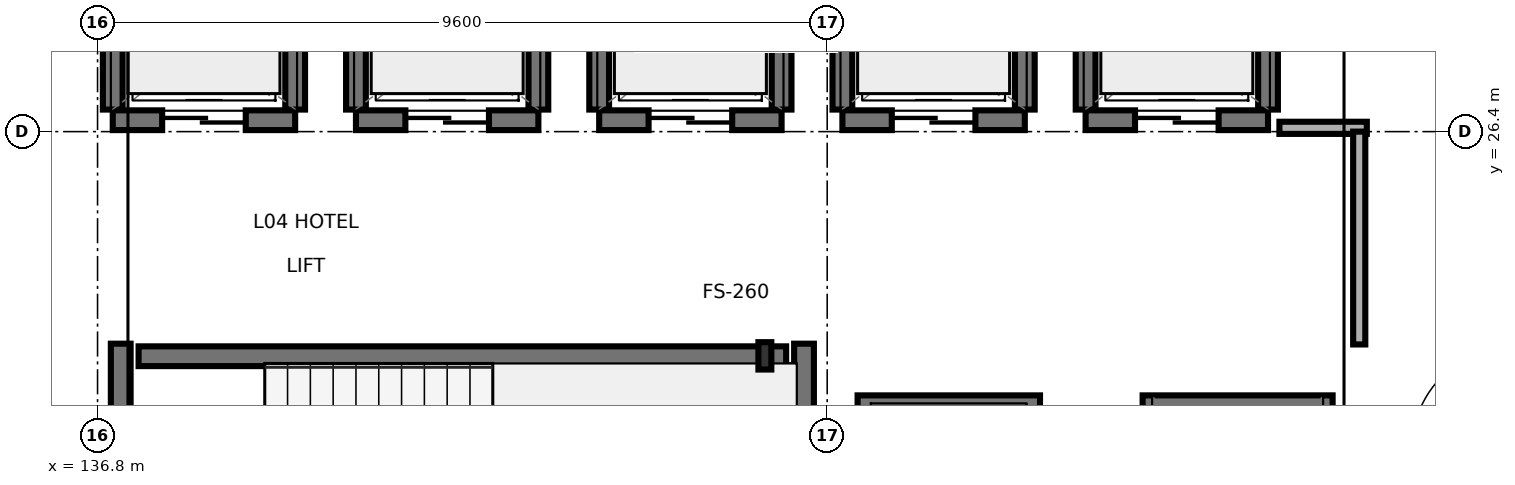
"""IFC4 building model, lengths in metres.
Left out: names, types, materials, properties, quantities, classifications, styles, units other than length and angle.
Written with IfcOpenShell. Run it as: python <this file> out.ifc"""

import sys

from ifc_helpers import new_model, si_unit, direction, frame, frame_2d, origin, origin_2d, place, context, subcontext, project, spatial, rectangle, i_section, extrude, element, fill, save


model = new_model("IFC4")
c1 = context("Model", 3, precision=1e-05, world=origin(), true_north=direction((0.0, 1.0)))
c2 = subcontext(c1, "Body", "Model", "MODEL_VIEW")
j1 = project(units=[si_unit("LENGTHUNIT", "METRE"), si_unit("PLANEANGLEUNIT", "RADIAN")], contexts=[c1])
p1 = place(None, origin())
s1 = spatial("IfcSite", under=j1, at=p1, CompositionType="ELEMENT")
p2 = place(p1, origin())
s2 = spatial("IfcBuilding", under=s1, at=p2, CompositionType="ELEMENT")
p3 = place(p2, frame((0.0, 0.0, 14.7)))
s3 = spatial("IfcBuildingStorey", under=s2, at=p3, CompositionType="ELEMENT", Elevation=14.7)
p4 = place(p3, frame((145.58, 23.45, 0.0), z_axis=(0.0, 0.0, 1.0), x_axis=(1.0, 0.0, 0.0)))
e1 = element("IfcColumn", 1, at=p4, inside=s3, PredefinedType="PILASTER", context=c2, shape_type="SweptSolid", body=[
    extrude(i_section(OverallWidth=0.17, OverallDepth=0.36, WebThickness=0.008, FlangeThickness=0.013, FilletRadius=0.018, at=origin_2d()), origin(), (0.0, 0.0, 1.0), 3.4),
])
p5 = place(p3, frame((137.105, 19.34, 0.0), z_axis=(0.0, 0.0, 1.0), x_axis=(0.0, 1.0, 0.0)))
e2 = element("IfcWall", 2, at=p5, inside=s3, PredefinedType="SHEAR", context=c2, shape_type="SweptSolid", body=[
    extrude(rectangle(XDim=4.27, YDim=0.26, at=frame_2d((2.135, 0.0))), origin(), (0.0, 0.0, 1.0), 3.215),
])
p6 = place(p5, frame((0.61, 0.0, 0.0)))
e3 = element("IfcOpeningElement", 3, at=p6, cuts=e2, PredefinedType="OPENING", context=c2, shape_type="SweptSolid", body=[
    extrude(rectangle(XDim=1.1, YDim=2.2, at=frame_2d((0.55, 1.1))), frame((0.0, 0.14, 0.0), z_axis=(0.0, -1.0, 0.0), x_axis=(1.0, 0.0, 0.0)), (0.0, 0.0, 1.0), 0.28),
])
p7 = place(p3, frame((146.095, 19.34, 0.0), z_axis=(0.0, 0.0, 1.0), x_axis=(0.0, 1.0, 0.0)))
e4 = element("IfcWall", 4, at=p7, inside=s3, PredefinedType="SHEAR", context=c2, shape_type="SweptSolid", body=[
    extrude(rectangle(XDim=4.27, YDim=0.26, at=frame_2d((2.135, 0.0))), origin(), (0.0, 0.0, 1.0), 3.215),
])
p8 = place(p3, frame((137.34, 23.445, 0.0), z_axis=(0.0, 0.0, 1.0), x_axis=(1.0, 0.0, 0.0)))
e5 = element("IfcWall", 5, at=p8, inside=s3, PredefinedType="SHEAR", context=c2, shape_type="SweptSolid", body=[
    extrude(rectangle(XDim=8.52, YDim=0.26, at=frame_2d((4.26, 0.0))), origin(), (0.0, 0.0, 1.0), 3.215),
])
p9 = place(p3, frame((137.0, 26.55, 0.0), z_axis=(0.0, 0.0, 1.0), x_axis=(1.0, 0.0, 0.0)))
e6 = element("IfcWall", 6, at=p9, inside=s3, PredefinedType="SHEAR", context=c2, shape_type="SweptSolid", body=[
    extrude(rectangle(XDim=2.4, YDim=0.26, at=frame_2d((1.2, 0.0))), origin(), (0.0, 0.0, 1.0), 2.75),
])
p10 = place(p9, frame((0.65, 0.0, 0.0)))
e7 = element("IfcOpeningElement", 7, at=p10, cuts=e6, PredefinedType="OPENING", context=c2, shape_type="SweptSolid", body=[
    extrude(rectangle(XDim=1.1, YDim=2.2, at=frame_2d((0.55, 1.1))), frame((0.0, 0.14, 0.0), z_axis=(0.0, -1.0, 0.0), x_axis=(1.0, 0.0, 0.0)), (0.0, 0.0, 1.0), 0.28),
])
for number, where, z_axis, x_axis in (
    (8, (137.0, 26.69, 0.0), (0.0, 0.0, 1.0), (0.0, 1.0, 0.0)),
    (9, (139.4, 26.69, 0.0), (0.0, 0.0, 1.0), (0.0, 1.0, 0.0)),
):
    element("IfcWall", number, at=place(p3, frame(where, z_axis=z_axis, x_axis=x_axis)), inside=s3, PredefinedType="SHEAR", context=c2, shape_type="SweptSolid", body=[
        extrude(rectangle(XDim=1.82, YDim=0.26, at=frame_2d((0.91, 0.0))), origin(), (0.0, 0.0, 1.0), 2.75),
    ])
p11 = place(p3, frame((140.2, 26.55, 0.0), z_axis=(0.0, 0.0, 1.0), x_axis=(1.0, 0.0, 0.0)))
e10 = element("IfcWall", 10, at=p11, inside=s3, PredefinedType="SHEAR", context=c2, shape_type="SweptSolid", body=[
    extrude(rectangle(XDim=2.4, YDim=0.26, at=frame_2d((1.2, 0.0))), origin(), (0.0, 0.0, 1.0), 3.215),
])
p12 = place(p11, frame((0.65, 0.0, 0.0)))
e11 = element("IfcOpeningElement", 11, at=p12, cuts=e10, PredefinedType="OPENING", context=c2, shape_type="SweptSolid", body=[
    extrude(rectangle(XDim=1.1, YDim=2.2, at=frame_2d((0.55, 1.1))), frame((0.0, 0.14, 0.0), z_axis=(0.0, -1.0, 0.0), x_axis=(1.0, 0.0, 0.0)), (0.0, 0.0, 1.0), 0.28),
])
for number, where, z_axis, x_axis in (
    (12, (140.2, 26.69, 0.0), (0.0, 0.0, 1.0), (0.0, 1.0, 0.0)),
    (13, (142.6, 26.69, 0.0), (0.0, 0.0, 1.0), (0.0, 1.0, 0.0)),
):
    element("IfcWall", number, at=place(p3, frame(where, z_axis=z_axis, x_axis=x_axis)), inside=s3, PredefinedType="SHEAR", context=c2, shape_type="SweptSolid", body=[
        extrude(rectangle(XDim=1.82, YDim=0.26, at=frame_2d((0.91, 0.0))), origin(), (0.0, 0.0, 1.0), 3.215),
    ])
p13 = place(p3, frame((143.4, 26.55, 0.0), z_axis=(0.0, 0.0, 1.0), x_axis=(1.0, 0.0, 0.0)))
e14 = element("IfcWall", 14, at=p13, inside=s3, PredefinedType="SHEAR", context=c2, shape_type="SweptSolid", body=[
    extrude(rectangle(XDim=2.4, YDim=0.26, at=frame_2d((1.2, 0.0))), origin(), (0.0, 0.0, 1.0), 3.215),
])
p14 = place(p13, frame((0.65, 0.0, 0.0)))
e15 = element("IfcOpeningElement", 15, at=p14, cuts=e14, PredefinedType="OPENING", context=c2, shape_type="SweptSolid", body=[
    extrude(rectangle(XDim=1.1, YDim=2.2, at=frame_2d((0.55, 1.1))), frame((0.0, 0.14, 0.0), z_axis=(0.0, -1.0, 0.0), x_axis=(1.0, 0.0, 0.0)), (0.0, 0.0, 1.0), 0.28),
])
for number, where, z_axis, x_axis in (
    (16, (143.4, 26.69, 0.0), (0.0, 0.0, 1.0), (0.0, 1.0, 0.0)),
    (17, (145.8, 26.69, 0.0), (0.0, 0.0, 1.0), (0.0, 1.0, 0.0)),
):
    element("IfcWall", number, at=place(p3, frame(where, z_axis=z_axis, x_axis=x_axis)), inside=s3, PredefinedType="SHEAR", context=c2, shape_type="SweptSolid", body=[
        extrude(rectangle(XDim=1.82, YDim=0.26, at=frame_2d((0.91, 0.0))), origin(), (0.0, 0.0, 1.0), 3.215),
    ])
p15 = place(p3, frame((146.6, 26.55, 0.0), z_axis=(0.0, 0.0, 1.0), x_axis=(1.0, 0.0, 0.0)))
e18 = element("IfcWall", 18, at=p15, inside=s3, PredefinedType="SHEAR", context=c2, shape_type="SweptSolid", body=[
    extrude(rectangle(XDim=2.4, YDim=0.26, at=frame_2d((1.2, 0.0))), origin(), (0.0, 0.0, 1.0), 3.215),
])
p16 = place(p15, frame((0.65, 0.0, 0.0)))
e19 = element("IfcOpeningElement", 19, at=p16, cuts=e18, PredefinedType="OPENING", context=c2, shape_type="SweptSolid", body=[
    extrude(rectangle(XDim=1.1, YDim=2.2, at=frame_2d((0.55, 1.1))), frame((0.0, 0.14, 0.0), z_axis=(0.0, -1.0, 0.0), x_axis=(1.0, 0.0, 0.0)), (0.0, 0.0, 1.0), 0.28),
])
for number, where, z_axis, x_axis in (
    (20, (146.6, 26.69, 0.0), (0.0, 0.0, 1.0), (0.0, 1.0, 0.0)),
    (21, (149.0, 26.69, 0.0), (0.0, 0.0, 1.0), (0.0, 1.0, 0.0)),
):
    element("IfcWall", number, at=place(p3, frame(where, z_axis=z_axis, x_axis=x_axis)), inside=s3, PredefinedType="SHEAR", context=c2, shape_type="SweptSolid", body=[
        extrude(rectangle(XDim=1.82, YDim=0.26, at=frame_2d((0.91, 0.0))), origin(), (0.0, 0.0, 1.0), 3.215),
    ])
p17 = place(p3, frame((149.8, 26.55, 0.0), z_axis=(0.0, 0.0, 1.0), x_axis=(1.0, 0.0, 0.0)))
e22 = element("IfcWall", 22, at=p17, inside=s3, PredefinedType="SHEAR", context=c2, shape_type="SweptSolid", body=[
    extrude(rectangle(XDim=2.4, YDim=0.26, at=frame_2d((1.2, 0.0))), origin(), (0.0, 0.0, 1.0), 3.215),
])
p18 = place(p17, frame((0.65, 0.0, 0.0)))
e23 = element("IfcOpeningElement", 23, at=p18, cuts=e22, PredefinedType="OPENING", context=c2, shape_type="SweptSolid", body=[
    extrude(rectangle(XDim=1.1, YDim=2.2, at=frame_2d((0.55, 1.1))), frame((0.0, 0.14, 0.0), z_axis=(0.0, -1.0, 0.0), x_axis=(1.0, 0.0, 0.0)), (0.0, 0.0, 1.0), 0.28),
])
for number, where, z_axis, x_axis in (
    (24, (149.8, 26.69, 0.0), (0.0, 0.0, 1.0), (0.0, 1.0, 0.0)),
    (25, (152.2, 26.69, 0.0), (0.0, 0.0, 1.0), (0.0, 1.0, 0.0)),
):
    element("IfcWall", number, at=place(p3, frame(where, z_axis=z_axis, x_axis=x_axis)), inside=s3, PredefinedType="SHEAR", context=c2, shape_type="SweptSolid", body=[
        extrude(rectangle(XDim=1.82, YDim=0.26, at=frame_2d((0.91, 0.0))), origin(), (0.0, 0.0, 1.0), 3.215),
    ])
p19 = place(p3, frame((146.8, 22.8, 0.0), z_axis=(0.0, 0.0, 1.0), x_axis=(1.0, 0.0, 0.0)))
e26 = element("IfcWall", 26, at=p19, inside=s3, PredefinedType="SHEAR", context=c2, shape_type="SweptSolid", body=[
    extrude(rectangle(XDim=2.4, YDim=0.26, at=frame_2d((1.2, 0.0))), origin(), (0.0, 0.0, 1.0), 3.215),
])
p20 = place(p3, frame((150.55, 22.8, 0.0), z_axis=(0.0, 0.0, 1.0), x_axis=(1.0, 0.0, 0.0)))
e27 = element("IfcWall", 27, at=p20, inside=s3, PredefinedType="SHEAR", context=c2, shape_type="SweptSolid", body=[
    extrude(rectangle(XDim=2.5, YDim=0.26, at=frame_2d((1.25, 0.0))), origin(), (0.0, 0.0, 1.0), 3.215),
])
p21 = place(p3, frame((152.35, 26.45, 0.0), z_axis=(0.0, 0.0, 1.0), x_axis=(1.0, 0.0, 0.0)))
e28 = element("IfcWall", 28, at=p21, inside=s3, PredefinedType="PARTITIONING", context=c2, shape_type="SweptSolid", body=[
    extrude(rectangle(XDim=1.15, YDim=0.16, at=frame_2d((0.575, 0.0))), origin(), (0.0, 0.0, 1.0), 3.215),
])
p22 = place(p3, frame((153.4, 23.6, 0.0), z_axis=(0.0, 0.0, 1.0), x_axis=(0.0, 1.0, 0.0)))
e29 = element("IfcWall", 29, at=p22, inside=s3, PredefinedType="PARTITIONING", context=c2, shape_type="SweptSolid", body=[
    extrude(rectangle(XDim=2.8, YDim=0.16, at=frame_2d((1.4, 0.0))), origin(), (0.0, 0.0, 1.0), 3.215),
])
p23 = place(p10, origin())
e30 = element("IfcDoor", 30, at=p23, inside=s3, OperationType="SLIDING_TO_LEFT", PredefinedType="DOOR", context=c2, shape_type="SweptSolid", body=[
    extrude(rectangle(XDim=1.1, YDim=2.2, at=frame_2d((0.55, 1.1))), frame((0.0, 0.025, 0.0), z_axis=(0.0, -1.0, 0.0), x_axis=(1.0, 0.0, 0.0)), (0.0, 0.0, 1.0), 0.05),
])
fill(e7, e30)
p24 = place(p12, origin())
e31 = element("IfcDoor", 31, at=p24, inside=s3, OperationType="SLIDING_TO_RIGHT", PredefinedType="DOOR", context=c2, shape_type="SweptSolid", body=[
    extrude(rectangle(XDim=1.1, YDim=2.2, at=frame_2d((0.55, 1.1))), frame((0.0, 0.025, 0.0), z_axis=(0.0, -1.0, 0.0), x_axis=(1.0, 0.0, 0.0)), (0.0, 0.0, 1.0), 0.05),
])
fill(e11, e31)
p25 = place(p14, origin())
e32 = element("IfcDoor", 32, at=p25, inside=s3, OperationType="SLIDING_TO_LEFT", PredefinedType="DOOR", context=c2, shape_type="SweptSolid", body=[
    extrude(rectangle(XDim=1.1, YDim=2.2, at=frame_2d((0.55, 1.1))), frame((0.0, 0.025, 0.0), z_axis=(0.0, -1.0, 0.0), x_axis=(1.0, 0.0, 0.0)), (0.0, 0.0, 1.0), 0.05),
])
fill(e15, e32)
p26 = place(p16, origin())
e33 = element("IfcDoor", 33, at=p26, inside=s3, OperationType="SLIDING_TO_RIGHT", PredefinedType="DOOR", context=c2, shape_type="SweptSolid", body=[
    extrude(rectangle(XDim=1.1, YDim=2.2, at=frame_2d((0.55, 1.1))), frame((0.0, 0.025, 0.0), z_axis=(0.0, -1.0, 0.0), x_axis=(1.0, 0.0, 0.0)), (0.0, 0.0, 1.0), 0.05),
])
fill(e19, e33)
p27 = place(p18, origin())
e34 = element("IfcDoor", 34, at=p27, inside=s3, OperationType="SLIDING_TO_LEFT", PredefinedType="DOOR", context=c2, shape_type="SweptSolid", body=[
    extrude(rectangle(XDim=1.1, YDim=2.2, at=frame_2d((0.55, 1.1))), frame((0.0, 0.025, 0.0), z_axis=(0.0, -1.0, 0.0), x_axis=(1.0, 0.0, 0.0)), (0.0, 0.0, 1.0), 0.05),
])
fill(e23, e34)
save(model, sys.argv[1])
